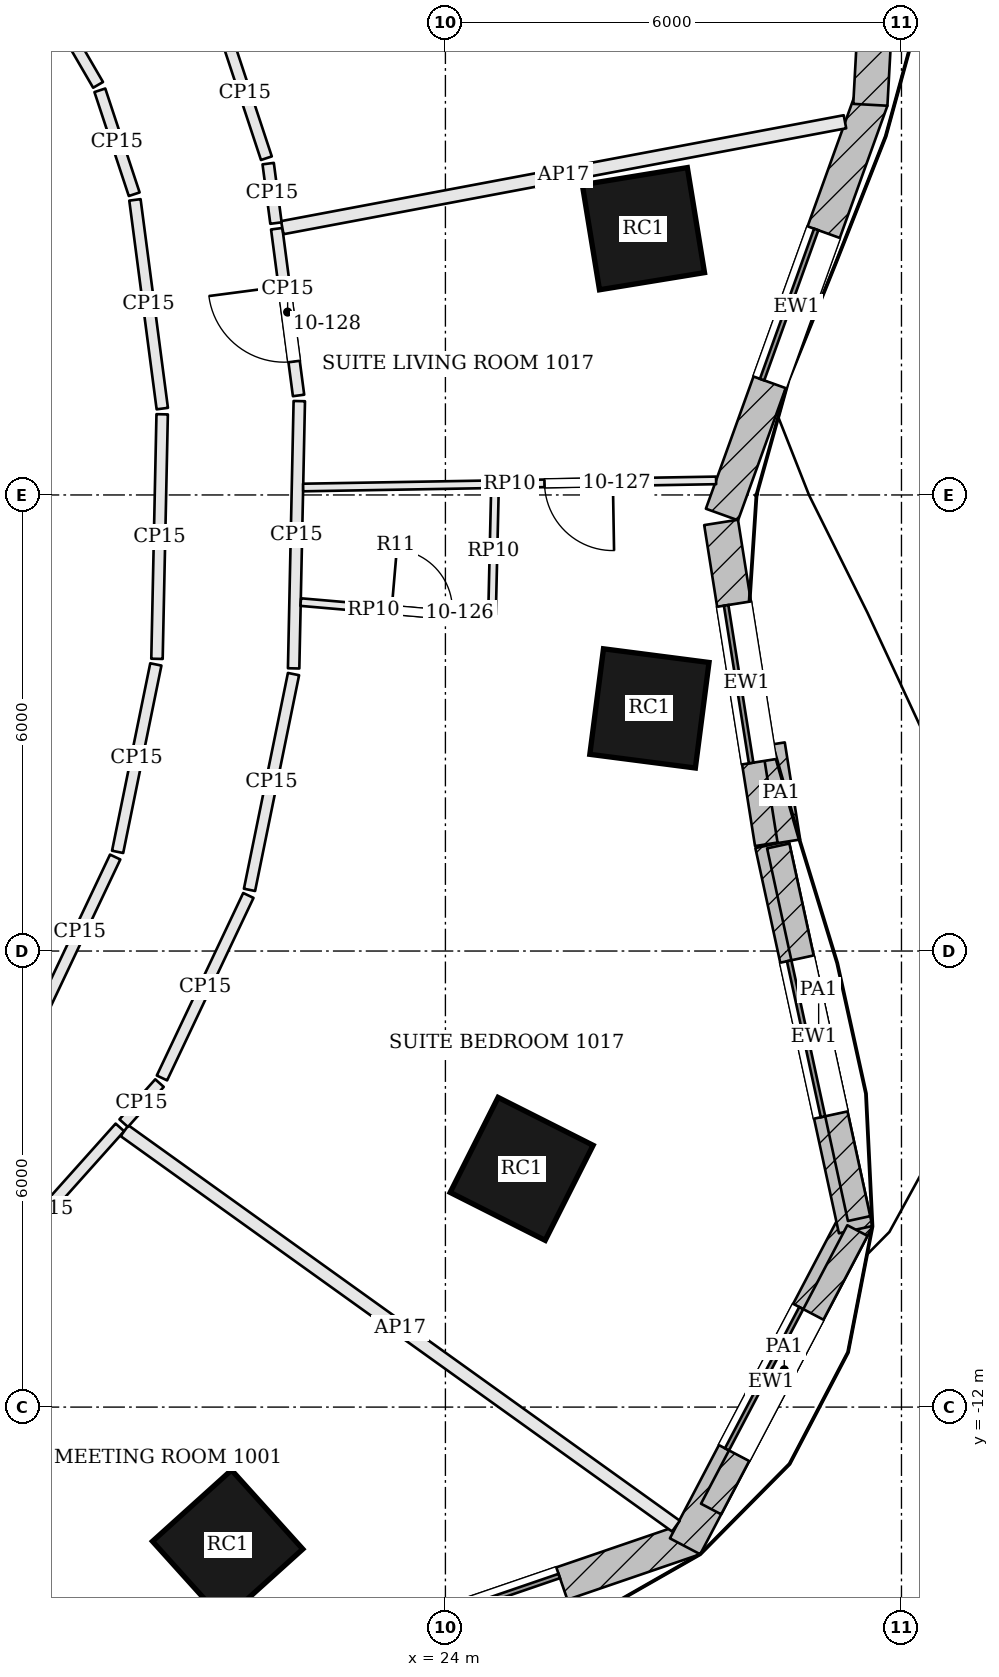
"""IFC4 building model, lengths in metres.
Left out: names, types, materials, properties, quantities, classifications, styles, units other than length and angle.
Written with IfcOpenShell. Run it as: python <this file> out.ifc"""

import sys

from ifc_helpers import new_model, si_unit, direction, frame, frame_2d, origin, origin_2d, place, context, subcontext, project, spatial, rectangle, extrude, element, fill, save


model = new_model("IFC4")
c1 = context("Model", 3, precision=1e-05, world=origin(), true_north=direction((0.0, 1.0)))
c2 = subcontext(c1, "Body", "Model", "MODEL_VIEW")
j1 = project(units=[si_unit("LENGTHUNIT", "METRE"), si_unit("PLANEANGLEUNIT", "RADIAN")], contexts=[c1])
p1 = place(None, origin())
s1 = spatial("IfcSite", under=j1, at=p1, CompositionType="ELEMENT")
p2 = place(p1, origin())
s2 = spatial("IfcBuilding", under=s1, at=p2, CompositionType="ELEMENT")
p3 = place(p2, frame((0.0, 0.0, 51.9)))
s3 = spatial("IfcBuildingStorey", under=s2, at=p3, CompositionType="ELEMENT", Elevation=51.9)
for number, where, z_axis, x_axis in (
    (1, (26.605, 3.503, 0.0), (0.0, 0.0, 1.0), (-0.161, 0.987, 0.0)),
    (2, (21.135, -13.817, 0.0), (0.0, 0.0, 1.0), (0.743, 0.67, 0.0)),
    (3, (25.003, -8.866, 0.0), (0.0, 0.0, 1.0), (0.45, 0.893, 0.0)),
    (4, (26.684, -2.808, 0.0), (0.0, 0.0, 1.0), (0.128, 0.992, 0.0)),
):
    element("IfcColumn", number, at=place(p3, frame(where, z_axis=z_axis, x_axis=x_axis)), inside=s3, PredefinedType="COLUMN", context=c2, shape_type="SweptSolid", body=[
        extrude(rectangle(XDim=1.4, YDim=1.4, at=origin_2d()), origin(), (0.0, 0.0, 1.0), 3.6),
    ])
p4 = place(p3, frame((27.638, -0.257, 0.0), z_axis=(0.0, 0.0, 1.0), x_axis=(0.338914809068, 0.940817066275, 0.0)))
e5 = element("IfcWall", 5, at=p4, inside=s3, PredefinedType="SOLIDWALL", context=c2, shape_type="SweptSolid", body=[
    extrude(rectangle(XDim=5.797, YDim=0.45, at=frame_2d((2.899, 0.0))), origin(), (0.0, 0.0, 1.0), 3.4),
])
p5 = place(p4, frame((1.849, 0.0, 0.9)))
e6 = element("IfcOpeningElement", 6, at=p5, cuts=e5, PredefinedType="OPENING", context=c2, shape_type="SweptSolid", body=[
    extrude(rectangle(XDim=2.1, YDim=2.0, at=frame_2d((1.05, 1.0))), frame((0.0, 0.235, 0.0), z_axis=(0.0, -1.0, 0.0), x_axis=(1.0, 0.0, 0.0)), (0.0, 0.0, 1.0), 0.47),
])
p6 = place(p3, frame((29.59, 5.133, 0.0), z_axis=(0.0, 0.0, 1.0), x_axis=(0.054738225791, 0.998500739427, 0.0)))
e7 = element("IfcWall", 7, at=p6, inside=s3, PredefinedType="SOLIDWALL", context=c2, shape_type="SweptSolid", body=[
    extrude(rectangle(XDim=4.656, YDim=0.45, at=frame_2d((2.328, 0.0))), origin(), (0.0, 0.0, 1.0), 3.4),
])
p7 = place(p6, frame((1.278, 0.0, 0.9)))
e8 = element("IfcOpeningElement", 8, at=p7, cuts=e7, PredefinedType="OPENING", context=c2, shape_type="SweptSolid", body=[
    extrude(rectangle(XDim=2.1, YDim=2.0, at=frame_2d((1.05, 1.0))), frame((0.0, 0.235, 0.0), z_axis=(0.0, -1.0, 0.0), x_axis=(1.0, 0.0, 0.0)), (0.0, 0.0, 1.0), 0.47),
])
p8 = place(p3, frame((21.803, -15.597, 0.0), z_axis=(0.0, 0.0, 1.0), x_axis=(0.946115314877, 0.323829910532, 0.0)))
e9 = element("IfcWall", 9, at=p8, inside=s3, PredefinedType="SOLIDWALL", context=c2, shape_type="SweptSolid", body=[
    extrude(rectangle(XDim=5.782, YDim=0.45, at=frame_2d((2.891, 0.0))), origin(), (0.0, 0.0, 1.0), 3.4),
])
p9 = place(p8, frame((1.841, 0.0, 0.9)))
e10 = element("IfcOpeningElement", 10, at=p9, cuts=e9, PredefinedType="OPENING", context=c2, shape_type="SweptSolid", body=[
    extrude(rectangle(XDim=2.1, YDim=2.0, at=frame_2d((1.05, 1.0))), frame((0.0, 0.235, 0.0), z_axis=(0.0, -1.0, 0.0), x_axis=(1.0, 0.0, 0.0)), (0.0, 0.0, 1.0), 0.47),
])
p10 = place(p3, frame((27.153, -13.831, 0.0), z_axis=(0.0, 0.0, 1.0), x_axis=(0.465165872942, 0.885223537108, 0.0)))
e11 = element("IfcWall", 11, at=p10, inside=s3, PredefinedType="SOLIDWALL", context=c2, shape_type="SweptSolid", body=[
    extrude(rectangle(XDim=4.871, YDim=0.45, at=frame_2d((2.436, 0.0))), origin(), (0.0, 0.0, 1.0), 3.4),
])
p11 = place(p10, frame((1.385, 0.0, 0.9)))
e12 = element("IfcOpeningElement", 12, at=p11, cuts=e11, PredefinedType="OPENING", context=c2, shape_type="SweptSolid", body=[
    extrude(rectangle(XDim=2.1, YDim=2.0, at=frame_2d((1.05, 1.0))), frame((0.0, 0.235, 0.0), z_axis=(0.0, -1.0, 0.0), x_axis=(1.0, 0.0, 0.0)), (0.0, 0.0, 1.0), 0.47),
])
p12 = place(p3, frame((29.397, -9.666, 0.0), z_axis=(0.0, 0.0, 1.0), x_axis=(-0.211962455994, 0.977277809657, 0.0)))
e13 = element("IfcWall", 13, at=p12, inside=s3, PredefinedType="SOLIDWALL", context=c2, shape_type="SweptSolid", body=[
    extrude(rectangle(XDim=5.186, YDim=0.45, at=frame_2d((2.593, 0.0))), origin(), (0.0, 0.0, 1.0), 3.4),
])
p13 = place(p12, frame((1.543, 0.0, 0.9)))
e14 = element("IfcOpeningElement", 14, at=p13, cuts=e13, PredefinedType="OPENING", context=c2, shape_type="SweptSolid", body=[
    extrude(rectangle(XDim=2.1, YDim=2.0, at=frame_2d((1.05, 1.0))), frame((0.0, 0.235, 0.0), z_axis=(0.0, -1.0, 0.0), x_axis=(1.0, 0.0, 0.0)), (0.0, 0.0, 1.0), 0.47),
])
p14 = place(p3, frame((28.296, -4.584, 0.0), z_axis=(0.0, 0.0, 1.0), x_axis=(-0.156402397796, 0.987693419014, 0.0)))
e15 = element("IfcWall", 15, at=p14, inside=s3, PredefinedType="SOLIDWALL", context=c2, shape_type="SweptSolid", body=[
    extrude(rectangle(XDim=4.276, YDim=0.45, at=frame_2d((2.138, 0.0))), origin(), (0.0, 0.0, 1.0), 3.4),
])
p15 = place(p14, frame((1.088, 0.0, 0.9)))
e16 = element("IfcOpeningElement", 16, at=p15, cuts=e15, PredefinedType="OPENING", context=c2, shape_type="SweptSolid", body=[
    extrude(rectangle(XDim=2.1, YDim=2.0, at=frame_2d((1.05, 1.0))), frame((0.0, 0.235, 0.0), z_axis=(0.0, -1.0, 0.0), x_axis=(1.0, 0.0, 0.0)), (0.0, 0.0, 1.0), 0.47),
])
p16 = place(p3, frame((27.495, -13.341, 3.6), z_axis=(0.0, 0.0, 1.0), x_axis=(0.46519687666, 0.88520724463, 0.0)))
e17 = element("IfcWall", 17, at=p16, inside=s3, PredefinedType="PARAPET", context=c2, shape_type="SweptSolid", body=[
    extrude(rectangle(XDim=4.139, YDim=0.3, at=frame_2d((2.069, 0.0))), origin(), (0.0, 0.0, 1.0), 1.1),
])
p17 = place(p3, frame((29.442, -9.52, 3.6), z_axis=(0.0, 0.0, 1.0), x_axis=(-0.211918382355, 0.977287367779, 0.0)))
e18 = element("IfcWall", 18, at=p17, inside=s3, PredefinedType="PARAPET", context=c2, shape_type="SweptSolid", body=[
    extrude(rectangle(XDim=5.016, YDim=0.3, at=frame_2d((2.508, 0.0))), origin(), (0.0, 0.0, 1.0), 1.1),
])
p18 = place(p3, frame((28.519, -4.556, 3.6), z_axis=(0.0, 0.0, 1.0), x_axis=(-0.156466543472, 0.987683259337, 0.0)))
e19 = element("IfcWall", 19, at=p18, inside=s3, PredefinedType="PARAPET", context=c2, shape_type="SweptSolid", body=[
    extrude(rectangle(XDim=1.293, YDim=0.3, at=frame_2d((0.647, 0.0))), origin(), (0.0, 0.0, 1.0), 1.1),
])
p19 = place(p3, frame((17.804, -10.46, 0.0), z_axis=(0.0, 0.0, 1.0), x_axis=(0.666578501565, 0.745434840379, 0.0)))
e20 = element("IfcWall", 20, at=p19, inside=s3, PredefinedType="PARTITIONING", context=c2, shape_type="SweptSolid", body=[
    extrude(rectangle(XDim=2.87, YDim=0.15, at=frame_2d((1.435, 0.0))), origin(), (0.0, 0.0, 1.0), 2.68),
])
p20 = place(p3, frame((27.033, -13.565, 0.0), z_axis=(0.0, 0.0, 1.0), x_axis=(-0.812688040514, 0.58269902077, 0.0)))
e21 = element("IfcWall", 21, at=p20, inside=s3, PredefinedType="PARTITIONING", context=c2, shape_type="SweptSolid", body=[
    extrude(rectangle(XDim=8.927, YDim=0.175, at=frame_2d((4.463, 0.0))), origin(), (0.0, 0.0, 1.0), 2.68),
])
p21 = place(p3, frame((19.767, -8.264, 0.0), z_axis=(0.0, 0.0, 1.0), x_axis=(0.666633300143, 0.745385835082, 0.0)))
e22 = element("IfcWall", 22, at=p21, inside=s3, PredefinedType="PARTITIONING", context=c2, shape_type="SweptSolid", body=[
    extrude(rectangle(XDim=0.707, YDim=0.15, at=frame_2d((0.354, 0.0))), origin(), (0.0, 0.0, 1.0), 2.68),
])
p22 = place(p3, frame((20.271, -7.67, 0.0), z_axis=(0.0, 0.0, 1.0), x_axis=(0.427995478521, 0.903780875193, 0.0)))
e23 = element("IfcWall", 23, at=p22, inside=s3, PredefinedType="PARTITIONING", context=c2, shape_type="SweptSolid", body=[
    extrude(rectangle(XDim=2.656, YDim=0.15, at=frame_2d((1.328, 0.0))), origin(), (0.0, 0.0, 1.0), 2.68),
])
p23 = place(p3, frame((21.423, -5.195, 0.0), z_axis=(0.0, 0.0, 1.0), x_axis=(0.199793264012, 0.979838074202, 0.0)))
e24 = element("IfcWall", 24, at=p23, inside=s3, PredefinedType="PARTITIONING", context=c2, shape_type="SweptSolid", body=[
    extrude(rectangle(XDim=2.897, YDim=0.15, at=frame_2d((1.449, 0.0))), origin(), (0.0, 0.0, 1.0), 2.68),
])
p24 = place(p3, frame((22.003, -2.281, 0.0), z_axis=(0.0, 0.0, 1.0), x_axis=(0.021172866829, 0.999775829729, 0.0)))
e25 = element("IfcWall", 25, at=p24, inside=s3, PredefinedType="PARTITIONING", context=c2, shape_type="SweptSolid", body=[
    extrude(rectangle(XDim=3.517, YDim=0.15, at=frame_2d((1.758, 0.0))), origin(), (0.0, 0.0, 1.0), 2.68),
])
p25 = place(p3, frame((22.068, 1.309, 0.0), z_axis=(0.0, 0.0, 1.0), x_axis=(-0.129886420754, 0.991528878906, 0.0)))
e26 = element("IfcWall", 26, at=p25, inside=s3, PredefinedType="PARTITIONING", context=c2, shape_type="SweptSolid", body=[
    extrude(rectangle(XDim=2.212, YDim=0.15, at=frame_2d((1.106, 0.0))), origin(), (0.0, 0.0, 1.0), 2.68),
])
p26 = place(p25, frame((0.45, 0.0, 0.0)))
e27 = element("IfcOpeningElement", 27, at=p26, cuts=e26, PredefinedType="OPENING", context=c2, shape_type="SweptSolid", body=[
    extrude(rectangle(XDim=1.0, YDim=2.1, at=frame_2d((0.5, 1.05))), frame((0.0, 0.085, 0.0), z_axis=(0.0, -1.0, 0.0), x_axis=(1.0, 0.0, 0.0)), (0.0, 0.0, 1.0), 0.17),
])
p27 = place(p3, frame((29.257, 4.91, 0.0), z_axis=(0.0, 0.0, 1.0), x_axis=(-0.982749785581, -0.184940149617, 0.0)))
e28 = element("IfcWall", 28, at=p27, inside=s3, PredefinedType="PARTITIONING", context=c2, shape_type="SweptSolid", body=[
    extrude(rectangle(XDim=7.532, YDim=0.175, at=frame_2d((3.766, 0.0))), origin(), (0.0, 0.0, 1.0), 2.68),
])
p28 = place(p3, frame((21.771, 3.577, 0.0), z_axis=(0.0, 0.0, 1.0), x_axis=(-0.129974188098, 0.991517377774, 0.0)))
e29 = element("IfcWall", 29, at=p28, inside=s3, PredefinedType="PARTITIONING", context=c2, shape_type="SweptSolid", body=[
    extrude(rectangle(XDim=0.789, YDim=0.15, at=frame_2d((0.395, 0.0))), origin(), (0.0, 0.0, 1.0), 2.68),
])
p29 = place(p3, frame((21.645, 4.43, 0.0), z_axis=(0.0, 0.0, 1.0), x_axis=(-0.313700743044, 0.949521902756, 0.0)))
e30 = element("IfcWall", 30, at=p29, inside=s3, PredefinedType="PARTITIONING", context=c2, shape_type="SweptSolid", body=[
    extrude(rectangle(XDim=1.798, YDim=0.15, at=frame_2d((0.899, 0.0))), origin(), (0.0, 0.0, 1.0), 2.68),
])
p30 = place(p3, frame((18.306, 7.329, 0.0), z_axis=(0.0, 0.0, 1.0), x_axis=(0.502425081691, -0.864620747662, 0.0)))
e31 = element("IfcWall", 31, at=p30, inside=s3, PredefinedType="PARTITIONING", context=c2, shape_type="SweptSolid", body=[
    extrude(rectangle(XDim=2.237, YDim=0.15, at=frame_2d((1.119, 0.0))), origin(), (0.0, 0.0, 1.0), 2.68),
])
p31 = place(p3, frame((19.454, 5.324, 0.0), z_axis=(0.0, 0.0, 1.0), x_axis=(0.313632756375, -0.949544361327, 0.0)))
e32 = element("IfcWall", 32, at=p31, inside=s3, PredefinedType="PARTITIONING", context=c2, shape_type="SweptSolid", body=[
    extrude(rectangle(XDim=1.44, YDim=0.15, at=frame_2d((0.72, 0.0))), origin(), (0.0, 0.0, 1.0), 2.68),
])
p32 = place(p3, frame((19.915, 3.882, 0.0), z_axis=(0.0, 0.0, 1.0), x_axis=(0.129945947446, -0.991521079323, 0.0)))
e33 = element("IfcWall", 33, at=p32, inside=s3, PredefinedType="PARTITIONING", context=c2, shape_type="SweptSolid", body=[
    extrude(rectangle(XDim=2.769, YDim=0.15, at=frame_2d((1.385, 0.0))), origin(), (0.0, 0.0, 1.0), 2.68),
])
p33 = place(p3, frame((20.273, 1.061, 0.0), z_axis=(0.0, 0.0, 1.0), x_axis=(-0.021166906337, -0.99977595594, 0.0)))
e34 = element("IfcWall", 34, at=p33, inside=s3, PredefinedType="PARTITIONING", context=c2, shape_type="SweptSolid", body=[
    extrude(rectangle(XDim=3.218, YDim=0.15, at=frame_2d((1.609, 0.0))), origin(), (0.0, 0.0, 1.0), 2.68),
])
p34 = place(p3, frame((20.19, -2.229, 0.0), z_axis=(0.0, 0.0, 1.0), x_axis=(-0.199752828647, -0.97984631828, 0.0)))
e35 = element("IfcWall", 35, at=p34, inside=s3, PredefinedType="PARTITIONING", context=c2, shape_type="SweptSolid", body=[
    extrude(rectangle(XDim=2.517, YDim=0.15, at=frame_2d((1.258, 0.0))), origin(), (0.0, 0.0, 1.0), 2.68),
])
p35 = place(p3, frame((19.655, -4.763, 0.0), z_axis=(0.0, 0.0, 1.0), x_axis=(-0.427965880464, -0.903794891089, 0.0)))
e36 = element("IfcWall", 36, at=p35, inside=s3, PredefinedType="PARTITIONING", context=c2, shape_type="SweptSolid", body=[
    extrude(rectangle(XDim=2.178, YDim=0.15, at=frame_2d((1.089, 0.0))), origin(), (0.0, 0.0, 1.0), 2.68),
])
p36 = place(p3, frame((27.561, 0.192, 0.0), z_axis=(0.0, 0.0, 1.0), x_axis=(-0.999851133368, -0.017254306813, 0.0)))
e37 = element("IfcWall", 37, at=p36, inside=s3, PredefinedType="PARTITIONING", context=c2, shape_type="SweptSolid", body=[
    extrude(rectangle(XDim=5.433, YDim=0.1, at=frame_2d((2.717, 0.0))), origin(), (0.0, 0.0, 1.0), 2.898),
])
p37 = place(p36, frame((1.358, 0.0, 0.0)))
e38 = element("IfcOpeningElement", 38, at=p37, cuts=e37, PredefinedType="OPENING", context=c2, shape_type="SweptSolid", body=[
    extrude(rectangle(XDim=0.9, YDim=2.4, at=frame_2d((0.45, 1.2))), frame((0.0, 0.06, 0.0), z_axis=(0.0, -1.0, 0.0), x_axis=(1.0, 0.0, 0.0)), (0.0, 0.0, 1.0), 0.12),
])
p38 = place(p3, frame((22.096, -1.409, 0.0), z_axis=(0.0, 0.0, 1.0), x_axis=(0.996307051097, -0.085861865428, 0.0)))
e39 = element("IfcWall", 39, at=p38, inside=s3, PredefinedType="PARTITIONING", context=c2, shape_type="SweptSolid", body=[
    extrude(rectangle(XDim=2.525, YDim=0.1, at=frame_2d((1.262, 0.0))), origin(), (0.0, 0.0, 1.0), 2.898),
])
p39 = place(p38, frame((1.2, 0.0, 0.0)))
e40 = element("IfcOpeningElement", 40, at=p39, cuts=e39, PredefinedType="OPENING", context=c2, shape_type="SweptSolid", body=[
    extrude(rectangle(XDim=0.8, YDim=2.1, at=frame_2d((0.4, 1.05))), frame((0.0, 0.06, 0.0), z_axis=(0.0, -1.0, 0.0), x_axis=(1.0, 0.0, 0.0)), (0.0, 0.0, 1.0), 0.12),
])
p40 = place(p3, frame((24.613, -1.576, 0.0), z_axis=(0.0, 0.0, 1.0), x_axis=(0.02312366458, 0.99973261232, 0.0)))
e41 = element("IfcWall", 41, at=p40, inside=s3, PredefinedType="PARTITIONING", context=c2, shape_type="SweptSolid", body=[
    extrude(rectangle(XDim=1.668, YDim=0.1, at=frame_2d((0.834, 0.0))), origin(), (0.0, 0.0, 1.0), 2.898),
])
p41 = place(p5, origin())
e42 = element("IfcWindow", 42, at=p41, inside=s3, PartitioningType="SINGLE_PANEL", PredefinedType="WINDOW", context=c2, shape_type="SweptSolid", body=[
    extrude(rectangle(XDim=2.1, YDim=2.0, at=frame_2d((1.05, 1.0))), frame((0.0, 0.135, 0.0), z_axis=(0.0, -1.0, 0.0), x_axis=(1.0, 0.0, 0.0)), (0.0, 0.0, 1.0), 0.06),
])
fill(e6, e42)
p42 = place(p9, origin())
e43 = element("IfcWindow", 43, at=p42, inside=s3, PartitioningType="SINGLE_PANEL", PredefinedType="WINDOW", context=c2, shape_type="SweptSolid", body=[
    extrude(rectangle(XDim=2.1, YDim=2.0, at=frame_2d((1.05, 1.0))), frame((0.0, 0.135, 0.0), z_axis=(0.0, -1.0, 0.0), x_axis=(1.0, 0.0, 0.0)), (0.0, 0.0, 1.0), 0.06),
])
fill(e10, e43)
p43 = place(p11, origin())
e44 = element("IfcWindow", 44, at=p43, inside=s3, PartitioningType="SINGLE_PANEL", PredefinedType="WINDOW", context=c2, shape_type="SweptSolid", body=[
    extrude(rectangle(XDim=2.1, YDim=2.0, at=frame_2d((1.05, 1.0))), frame((0.0, 0.135, 0.0), z_axis=(0.0, -1.0, 0.0), x_axis=(1.0, 0.0, 0.0)), (0.0, 0.0, 1.0), 0.06),
])
fill(e12, e44)
p44 = place(p13, origin())
e45 = element("IfcWindow", 45, at=p44, inside=s3, PartitioningType="SINGLE_PANEL", PredefinedType="WINDOW", context=c2, shape_type="SweptSolid", body=[
    extrude(rectangle(XDim=2.1, YDim=2.0, at=frame_2d((1.05, 1.0))), frame((0.0, 0.135, 0.0), z_axis=(0.0, -1.0, 0.0), x_axis=(1.0, 0.0, 0.0)), (0.0, 0.0, 1.0), 0.06),
])
fill(e14, e45)
p45 = place(p15, origin())
e46 = element("IfcWindow", 46, at=p45, inside=s3, PartitioningType="SINGLE_PANEL", PredefinedType="WINDOW", context=c2, shape_type="SweptSolid", body=[
    extrude(rectangle(XDim=2.1, YDim=2.0, at=frame_2d((1.05, 1.0))), frame((0.0, 0.135, 0.0), z_axis=(0.0, -1.0, 0.0), x_axis=(1.0, 0.0, 0.0)), (0.0, 0.0, 1.0), 0.06),
])
fill(e16, e46)
p46 = place(p39, origin())
e47 = element("IfcDoor", 47, at=p46, inside=s3, OperationType="SINGLE_SWING_LEFT", PredefinedType="DOOR", context=c2, shape_type="SweptSolid", body=[
    extrude(rectangle(XDim=0.8, YDim=2.1, at=frame_2d((0.4, 1.05))), frame((0.0, 0.025, 0.0), z_axis=(0.0, -1.0, 0.0), x_axis=(1.0, 0.0, 0.0)), (0.0, 0.0, 1.0), 0.05),
])
fill(e40, e47)
p47 = place(p37, origin())
e48 = element("IfcDoor", 48, at=p47, inside=s3, OperationType="SINGLE_SWING_LEFT", PredefinedType="DOOR", context=c2, shape_type="SweptSolid", body=[
    extrude(rectangle(XDim=0.9, YDim=2.4, at=frame_2d((0.45, 1.2))), frame((0.0, 0.025, 0.0), z_axis=(0.0, -1.0, 0.0), x_axis=(1.0, 0.0, 0.0)), (0.0, 0.0, 1.0), 0.05),
])
fill(e38, e48)
p48 = place(p26, origin())
e49 = element("IfcDoor", 49, at=p48, inside=s3, OperationType="SINGLE_SWING_RIGHT", PredefinedType="DOOR", context=c2, shape_type="SweptSolid", body=[
    extrude(rectangle(XDim=1.0, YDim=2.1, at=frame_2d((0.5, 1.05))), frame((0.0, 0.025, 0.0), z_axis=(0.0, -1.0, 0.0), x_axis=(1.0, 0.0, 0.0)), (0.0, 0.0, 1.0), 0.05),
])
fill(e27, e49)
save(model, sys.argv[1])
